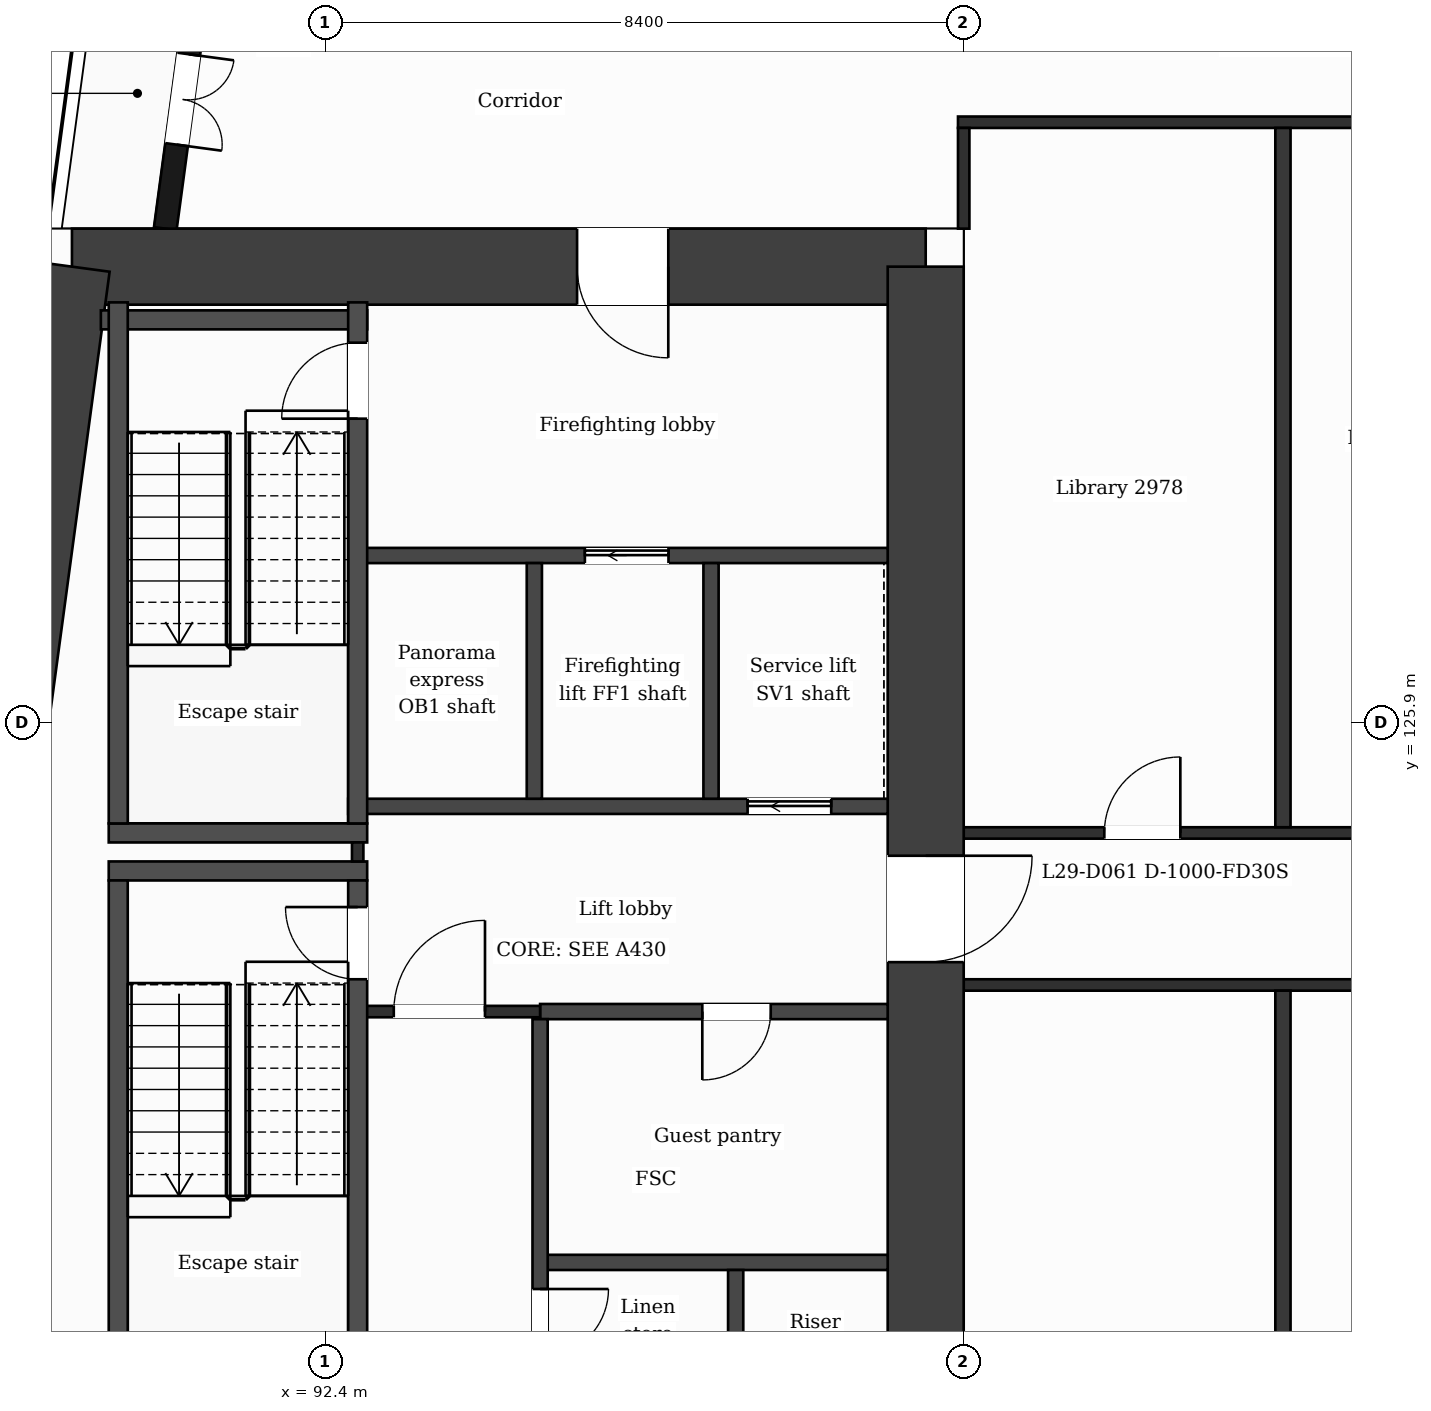
"""IFC4 building model, lengths in metres.
Left out: names, types, materials, properties, quantities, classifications, styles, units other than length and angle.
Written with IfcOpenShell. Run it as: python <this file> out.ifc"""

import sys

from ifc_helpers import new_model, si_unit, direction, frame, frame_2d, origin, place, context, subcontext, project, spatial, rectangle, extrude, element, fill, save


model = new_model("IFC4")
c1 = context("Model", 3, precision=1e-05, world=origin(), true_north=direction((0.0, 1.0)))
c2 = subcontext(c1, "Body", "Model", "MODEL_VIEW")
j1 = project(units=[si_unit("LENGTHUNIT", "METRE"), si_unit("PLANEANGLEUNIT", "RADIAN")], contexts=[c1])
p1 = place(None, origin())
s1 = spatial("IfcSite", under=j1, at=p1, CompositionType="ELEMENT")
p2 = place(p1, origin())
s2 = spatial("IfcBuilding", under=s1, at=p2, CompositionType="ELEMENT")
p3 = place(p2, frame((0.0, 0.0, 124.3)))
s3 = spatial("IfcBuildingStorey", under=s2, at=p3, CompositionType="ELEMENT", Elevation=124.3)
p4 = place(p3, frame((89.068, 131.9, 0.0), z_axis=(0.0, 0.0, 1.0), x_axis=(1.0, 0.0, 0.0)))
e1 = element("IfcWall", 1, at=p4, inside=s3, PredefinedType="SHEAR", context=c2, shape_type="SweptSolid", body=[
    extrude(rectangle(XDim=11.232, YDim=1.0, at=frame_2d((5.616, 0.0))), origin(), (0.0, 0.0, 1.0), 3.7),
])
p5 = place(p4, frame((6.646, 0.0, 0.0)))
e2 = element("IfcOpeningElement", 2, at=p5, cuts=e1, PredefinedType="OPENING", context=c2, shape_type="SweptSolid", body=[
    extrude(rectangle(XDim=1.2, YDim=2.1, at=frame_2d((0.6, 1.05))), frame((0.0, 0.51, 0.0), z_axis=(0.0, -1.0, 0.0), x_axis=(1.0, 0.0, 0.0)), (0.0, 0.0, 1.0), 1.02),
])
p6 = place(p3, frame((100.3, 131.9, 0.0), z_axis=(0.0, 0.0, 1.0), x_axis=(0.0, -1.0, 0.0)))
e3 = element("IfcWall", 3, at=p6, inside=s3, PredefinedType="SHEAR", context=c2, shape_type="SweptSolid", body=[
    extrude(rectangle(XDim=21.0, YDim=1.0, at=frame_2d((10.5, 0.0))), origin(), (0.0, 0.0, 1.0), 3.7),
])
p7 = place(p6, frame((7.75, 0.0, 0.0)))
e4 = element("IfcOpeningElement", 4, at=p7, cuts=e3, PredefinedType="OPENING", context=c2, shape_type="SweptSolid", body=[
    extrude(rectangle(XDim=1.4, YDim=2.1, at=frame_2d((0.7, 1.05))), frame((0.0, 0.51, 0.0), z_axis=(0.0, -1.0, 0.0), x_axis=(1.0, 0.0, 0.0)), (0.0, 0.0, 1.0), 1.02),
])
p8 = place(p3, frame((86.241, 110.9, 0.0), z_axis=(0.0, 0.0, 1.0), x_axis=(0.133411141623, 0.991060778808, 0.0)))
e5 = element("IfcWall", 5, at=p8, inside=s3, PredefinedType="SHEAR", context=c2, shape_type="SweptSolid", body=[
    extrude(rectangle(XDim=21.189, YDim=1.0, at=frame_2d((10.595, 0.0))), origin(), (0.0, 0.0, 1.0), 3.7),
])
p9 = place(p3, frame((91.177, 138.95, 0.0), z_axis=(0.0, 0.0, 1.0), x_axis=(-0.133426664613, -0.991058689065, 0.0)))
e6 = element("IfcWall", 6, at=p9, inside=s3, PredefinedType="SOLIDWALL", context=c2, shape_type="SweptSolid", body=[
    extrude(rectangle(XDim=6.609, YDim=0.3, at=frame_2d((3.305, 0.0))), origin(), (0.0, 0.0, 1.0), 3.38),
])
p10 = place(p9, frame((1.039, 0.0, 0.9)))
e7 = element("IfcOpeningElement", 7, at=p10, cuts=e6, PredefinedType="OPENING", context=c2, shape_type="SweptSolid", body=[
    extrude(rectangle(XDim=1.2, YDim=2.1, at=frame_2d((0.6, 1.05))), frame((0.0, 0.16, 0.0), z_axis=(0.0, -1.0, 0.0), x_axis=(1.0, 0.0, 0.0)), (0.0, 0.0, 1.0), 0.32),
])
p11 = place(p9, frame((4.294, 0.0, 0.0)))
e8 = element("IfcOpeningElement", 8, at=p11, cuts=e6, PredefinedType="OPENING", context=c2, shape_type="SweptSolid", body=[
    extrude(rectangle(XDim=1.2, YDim=2.4, at=frame_2d((0.6, 1.2))), frame((0.0, 0.16, 0.0), z_axis=(0.0, -1.0, 0.0), x_axis=(1.0, 0.0, 0.0)), (0.0, 0.0, 1.0), 0.32),
])
p12 = place(p3, frame((95.227, 118.8, 0.0), z_axis=(0.0, 0.0, 1.0), x_axis=(1.0, 0.0, 0.0)))
e9 = element("IfcWall", 9, at=p12, inside=s3, PredefinedType="PARTITIONING", context=c2, shape_type="SweptSolid", body=[
    extrude(rectangle(XDim=4.573, YDim=0.2, at=frame_2d((2.287, 0.0))), origin(), (0.0, 0.0, 1.0), 3.38),
])
p13 = place(p3, frame((95.227, 122.1, 0.0), z_axis=(0.0, 0.0, 1.0), x_axis=(1.0, 0.0, 0.0)))
e10 = element("IfcWall", 10, at=p13, inside=s3, PredefinedType="PARTITIONING", context=c2, shape_type="SweptSolid", body=[
    extrude(rectangle(XDim=4.573, YDim=0.2, at=frame_2d((2.287, 0.0))), origin(), (0.0, 0.0, 1.0), 3.38),
])
p14 = place(p13, frame((2.134, 0.0, 0.0)))
e11 = element("IfcOpeningElement", 11, at=p14, cuts=e10, PredefinedType="OPENING", context=c2, shape_type="SweptSolid", body=[
    extrude(rectangle(XDim=0.9, YDim=2.1, at=frame_2d((0.45, 1.05))), frame((0.0, 0.11, 0.0), z_axis=(0.0, -1.0, 0.0), x_axis=(1.0, 0.0, 0.0)), (0.0, 0.0, 1.0), 0.22),
])
p15 = place(p3, frame((92.827, 122.1, 0.0), z_axis=(0.0, 0.0, 1.0), x_axis=(1.0, 0.0, 0.0)))
e12 = element("IfcWall", 12, at=p15, inside=s3, PredefinedType="PARTITIONING", context=c2, shape_type="SweptSolid", body=[
    extrude(rectangle(XDim=2.4, YDim=0.15, at=frame_2d((1.2, 0.0))), origin(), (0.0, 0.0, 1.0), 3.38),
])
p16 = place(p15, frame((0.475, 0.0, 0.0)))
e13 = element("IfcOpeningElement", 13, at=p16, cuts=e12, PredefinedType="OPENING", context=c2, shape_type="SweptSolid", body=[
    extrude(rectangle(XDim=1.2, YDim=2.1, at=frame_2d((0.6, 1.05))), frame((0.0, 0.085, 0.0), z_axis=(0.0, -1.0, 0.0), x_axis=(1.0, 0.0, 0.0)), (0.0, 0.0, 1.0), 0.17),
])
p17 = place(p3, frame((100.8, 122.45, 0.0), z_axis=(0.0, 0.0, 1.0), x_axis=(1.0, 0.0, 0.0)))
e14 = element("IfcWall", 14, at=p17, inside=s3, PredefinedType="PARTITIONING", context=c2, shape_type="SweptSolid", body=[
    extrude(rectangle(XDim=25.2, YDim=0.15, at=frame_2d((12.6, 0.0))), origin(), (0.0, 0.0, 1.0), 3.38),
])
for number, where, z_axis, x_axis in (
    (15, (89.552, 123.95, 0.0), (0.0, 0.0, 1.0), (1.0, 0.0, 0.0)),
    (16, (89.552, 124.45, 0.0), (0.0, 0.0, 1.0), (1.0, 0.0, 0.0)),
):
    element("IfcWall", number, at=place(p3, frame(where, z_axis=z_axis, x_axis=x_axis)), inside=s3, PredefinedType="PARTITIONING", context=c2, shape_type="SweptSolid", body=[
        extrude(rectangle(XDim=3.4, YDim=0.25, at=frame_2d((1.7, 0.0))), origin(), (0.0, 0.0, 1.0), 3.38),
    ])
p18 = place(p3, frame((100.8, 124.45, 0.0), z_axis=(0.0, 0.0, 1.0), x_axis=(1.0, 0.0, 0.0)))
e17 = element("IfcWall", 17, at=p18, inside=s3, PredefinedType="PARTITIONING", context=c2, shape_type="SweptSolid", body=[
    extrude(rectangle(XDim=25.2, YDim=0.15, at=frame_2d((12.6, 0.0))), origin(), (0.0, 0.0, 1.0), 3.38),
])
p19 = place(p18, frame((1.85, 0.0, 0.0)))
e18 = element("IfcOpeningElement", 18, at=p19, cuts=e17, PredefinedType="OPENING", context=c2, shape_type="SweptSolid", body=[
    extrude(rectangle(XDim=1.0, YDim=2.1, at=frame_2d((0.5, 1.05))), frame((0.0, 0.085, 0.0), z_axis=(0.0, -1.0, 0.0), x_axis=(1.0, 0.0, 0.0)), (0.0, 0.0, 1.0), 0.17),
])
p20 = place(p18, frame((6.425, 0.0, 0.0)))
e19 = element("IfcOpeningElement", 19, at=p20, cuts=e17, PredefinedType="OPENING", context=c2, shape_type="SweptSolid", body=[
    extrude(rectangle(XDim=1.0, YDim=2.1, at=frame_2d((0.5, 1.05))), frame((0.0, 0.085, 0.0), z_axis=(0.0, -1.0, 0.0), x_axis=(1.0, 0.0, 0.0)), (0.0, 0.0, 1.0), 0.17),
])
p21 = place(p18, frame((12.77, 0.0, 0.0)))
e20 = element("IfcOpeningElement", 20, at=p21, cuts=e17, PredefinedType="OPENING", context=c2, shape_type="SweptSolid", body=[
    extrude(rectangle(XDim=1.0, YDim=2.1, at=frame_2d((0.5, 1.05))), frame((0.0, 0.085, 0.0), z_axis=(0.0, -1.0, 0.0), x_axis=(1.0, 0.0, 0.0)), (0.0, 0.0, 1.0), 0.17),
])
p22 = place(p18, frame((17.8, 0.0, 0.0)))
e21 = element("IfcOpeningElement", 21, at=p22, cuts=e17, PredefinedType="OPENING", context=c2, shape_type="SweptSolid", body=[
    extrude(rectangle(XDim=1.0, YDim=2.1, at=frame_2d((0.5, 1.05))), frame((0.0, 0.085, 0.0), z_axis=(0.0, -1.0, 0.0), x_axis=(1.0, 0.0, 0.0)), (0.0, 0.0, 1.0), 0.17),
])
p23 = place(p18, frame((22.85, 0.0, 0.0)))
e22 = element("IfcOpeningElement", 22, at=p23, cuts=e17, PredefinedType="OPENING", context=c2, shape_type="SweptSolid", body=[
    extrude(rectangle(XDim=1.0, YDim=2.1, at=frame_2d((0.5, 1.05))), frame((0.0, 0.085, 0.0), z_axis=(0.0, -1.0, 0.0), x_axis=(1.0, 0.0, 0.0)), (0.0, 0.0, 1.0), 0.17),
])
p24 = place(p3, frame((92.702, 124.8, 0.0), z_axis=(0.0, 0.0, 1.0), x_axis=(1.0, 0.0, 0.0)))
e23 = element("IfcWall", 23, at=p24, inside=s3, PredefinedType="PARTITIONING", context=c2, shape_type="SweptSolid", body=[
    extrude(rectangle(XDim=7.098, YDim=0.2, at=frame_2d((3.549, 0.0))), origin(), (0.0, 0.0, 1.0), 3.38),
])
p25 = place(p24, frame((5.255, 0.0, 0.0)))
e24 = element("IfcOpeningElement", 24, at=p25, cuts=e23, PredefinedType="OPENING", context=c2, shape_type="SweptSolid", body=[
    extrude(rectangle(XDim=1.1, YDim=2.1, at=frame_2d((0.55, 1.05))), frame((0.0, 0.11, 0.0), z_axis=(0.0, -1.0, 0.0), x_axis=(1.0, 0.0, 0.0)), (0.0, 0.0, 1.0), 0.22),
])
p26 = place(p3, frame((92.827, 128.1, 0.0), z_axis=(0.0, 0.0, 1.0), x_axis=(1.0, 0.0, 0.0)))
e25 = element("IfcWall", 25, at=p26, inside=s3, PredefinedType="PARTITIONING", context=c2, shape_type="SweptSolid", body=[
    extrude(rectangle(XDim=6.973, YDim=0.2, at=frame_2d((3.487, 0.0))), origin(), (0.0, 0.0, 1.0), 3.38),
])
p27 = place(p26, frame((2.989, 0.0, 0.0)))
e26 = element("IfcOpeningElement", 26, at=p27, cuts=e25, PredefinedType="OPENING", context=c2, shape_type="SweptSolid", body=[
    extrude(rectangle(XDim=1.1, YDim=2.1, at=frame_2d((0.55, 1.05))), frame((0.0, 0.11, 0.0), z_axis=(0.0, -1.0, 0.0), x_axis=(1.0, 0.0, 0.0)), (0.0, 0.0, 1.0), 0.22),
])
p28 = place(p3, frame((89.448, 131.2, 0.0), z_axis=(0.0, 0.0, 1.0), x_axis=(1.0, 0.0, 0.0)))
e27 = element("IfcWall", 27, at=p28, inside=s3, PredefinedType="PARTITIONING", context=c2, shape_type="SweptSolid", body=[
    extrude(rectangle(XDim=3.504, YDim=0.25, at=frame_2d((1.752, 0.0))), origin(), (0.0, 0.0, 1.0), 3.38),
])
p29 = place(p3, frame((100.725, 133.8, 0.0), z_axis=(0.0, 0.0, 1.0), x_axis=(1.0, 0.0, 0.0)))
e28 = element("IfcWall", 28, at=p29, inside=s3, PredefinedType="PARTITIONING", context=c2, shape_type="SweptSolid", body=[
    extrude(rectangle(XDim=25.35, YDim=0.15, at=frame_2d((12.675, 0.0))), origin(), (0.0, 0.0, 1.0), 3.38),
])
p30 = place(p29, frame((18.225, 0.0, 0.0)))
e29 = element("IfcOpeningElement", 29, at=p30, cuts=e28, PredefinedType="OPENING", context=c2, shape_type="SweptSolid", body=[
    extrude(rectangle(XDim=1.0, YDim=2.1, at=frame_2d((0.5, 1.05))), frame((0.0, 0.085, 0.0), z_axis=(0.0, -1.0, 0.0), x_axis=(1.0, 0.0, 0.0)), (0.0, 0.0, 1.0), 0.17),
])
for number, where, z_axis, x_axis in (
    (30, (89.677, 116.97, 0.0), (0.0, 0.0, 1.0), (0.0, 1.0, 0.0)),
    (31, (89.677, 124.575, 0.0), (0.0, 0.0, 1.0), (0.0, 1.0, 0.0)),
):
    element("IfcWall", number, at=place(p3, frame(where, z_axis=z_axis, x_axis=x_axis)), inside=s3, PredefinedType="PARTITIONING", context=c2, shape_type="SweptSolid", body=[
        extrude(rectangle(XDim=6.855, YDim=0.25, at=frame_2d((3.427, 0.0))), origin(), (0.0, 0.0, 1.0), 3.38),
    ])
p31 = place(p3, frame((92.827, 124.075, 0.0), z_axis=(0.0, 0.0, 1.0), x_axis=(0.0, 1.0, 0.0)))
e32 = element("IfcWall", 32, at=p31, inside=s3, PredefinedType="PARTITIONING", context=c2, shape_type="SweptSolid", body=[
    extrude(rectangle(XDim=0.25, YDim=0.15, at=frame_2d((0.125, 0.0))), origin(), (0.0, 0.0, 1.0), 3.38),
])
p32 = place(p3, frame((92.827, 116.97, 0.0), z_axis=(0.0, 0.0, 1.0), x_axis=(0.0, 1.0, 0.0)))
e33 = element("IfcWall", 33, at=p32, inside=s3, PredefinedType="PARTITIONING", context=c2, shape_type="SweptSolid", body=[
    extrude(rectangle(XDim=6.855, YDim=0.25, at=frame_2d((3.427, 0.0))), origin(), (0.0, 0.0, 1.0), 3.38),
])
p33 = place(p32, frame((5.555, 0.0, 0.0)))
e34 = element("IfcOpeningElement", 34, at=p33, cuts=e33, PredefinedType="OPENING", context=c2, shape_type="SweptSolid", body=[
    extrude(rectangle(XDim=0.95, YDim=2.1, at=frame_2d((0.475, 1.05))), frame((0.0, 0.135, 0.0), z_axis=(0.0, -1.0, 0.0), x_axis=(1.0, 0.0, 0.0)), (0.0, 0.0, 1.0), 0.27),
])
p34 = place(p3, frame((92.827, 124.575, 0.0), z_axis=(0.0, 0.0, 1.0), x_axis=(0.0, 1.0, 0.0)))
e35 = element("IfcWall", 35, at=p34, inside=s3, PredefinedType="PARTITIONING", context=c2, shape_type="SweptSolid", body=[
    extrude(rectangle(XDim=6.855, YDim=0.25, at=frame_2d((3.427, 0.0))), origin(), (0.0, 0.0, 1.0), 3.38),
])
p35 = place(p34, frame((5.325, 0.0, 0.0)))
e36 = element("IfcOpeningElement", 36, at=p35, cuts=e35, PredefinedType="OPENING", context=c2, shape_type="SweptSolid", body=[
    extrude(rectangle(XDim=1.0, YDim=2.1, at=frame_2d((0.5, 1.05))), frame((0.0, 0.135, 0.0), z_axis=(0.0, -1.0, 0.0), x_axis=(1.0, 0.0, 0.0)), (0.0, 0.0, 1.0), 0.27),
])
p36 = place(p3, frame((95.151, 124.9, 0.0), z_axis=(0.0, 0.0, 1.0), x_axis=(0.0, 1.0, 0.0)))
e37 = element("IfcWall", 37, at=p36, inside=s3, PredefinedType="PARTITIONING", context=c2, shape_type="SweptSolid", body=[
    extrude(rectangle(XDim=3.1, YDim=0.2, at=frame_2d((1.55, 0.0))), origin(), (0.0, 0.0, 1.0), 3.38),
])
p37 = place(p3, frame((95.227, 116.97, 0.0), z_axis=(0.0, 0.0, 1.0), x_axis=(0.0, 1.0, 0.0)))
e38 = element("IfcWall", 38, at=p37, inside=s3, PredefinedType="PARTITIONING", context=c2, shape_type="SweptSolid", body=[
    extrude(rectangle(XDim=5.03, YDim=0.2, at=frame_2d((2.515, 0.0))), origin(), (0.0, 0.0, 1.0), 3.38),
])
p38 = place(p37, frame((0.58, 0.0, 0.0)))
e39 = element("IfcOpeningElement", 39, at=p38, cuts=e38, PredefinedType="OPENING", context=c2, shape_type="SweptSolid", body=[
    extrude(rectangle(XDim=0.9, YDim=2.1, at=frame_2d((0.45, 1.05))), frame((0.0, 0.11, 0.0), z_axis=(0.0, -1.0, 0.0), x_axis=(1.0, 0.0, 0.0)), (0.0, 0.0, 1.0), 0.22),
])
p39 = place(p3, frame((97.476, 124.9, 0.0), z_axis=(0.0, 0.0, 1.0), x_axis=(0.0, 1.0, 0.0)))
e40 = element("IfcWall", 40, at=p39, inside=s3, PredefinedType="PARTITIONING", context=c2, shape_type="SweptSolid", body=[
    extrude(rectangle(XDim=3.1, YDim=0.2, at=frame_2d((1.55, 0.0))), origin(), (0.0, 0.0, 1.0), 3.38),
])
p40 = place(p3, frame((97.8, 116.97, 0.0), z_axis=(0.0, 0.0, 1.0), x_axis=(0.0, 1.0, 0.0)))
e41 = element("IfcWall", 41, at=p40, inside=s3, PredefinedType="PARTITIONING", context=c2, shape_type="SweptSolid", body=[
    extrude(rectangle(XDim=1.73, YDim=0.2, at=frame_2d((0.865, 0.0))), origin(), (0.0, 0.0, 1.0), 3.38),
])
p41 = place(p3, frame((100.8, 132.4, 0.0), z_axis=(0.0, 0.0, 1.0), x_axis=(0.0, 1.0, 0.0)))
e42 = element("IfcWall", 42, at=p41, inside=s3, PredefinedType="PARTITIONING", context=c2, shape_type="SweptSolid", body=[
    extrude(rectangle(XDim=1.325, YDim=0.15, at=frame_2d((0.663, 0.0))), origin(), (0.0, 0.0, 1.0), 3.38),
])
p42 = place(p3, frame((105.0, 109.075, 0.0), z_axis=(0.0, 0.0, 1.0), x_axis=(0.0, 1.0, 0.0)))
e43 = element("IfcWall", 43, at=p42, inside=s3, PredefinedType="PARTITIONING", context=c2, shape_type="SweptSolid", body=[
    extrude(rectangle(XDim=13.3, YDim=0.2, at=frame_2d((6.65, 0.0))), origin(), (0.0, 0.0, 1.0), 3.38),
])
p43 = place(p3, frame((105.0, 124.525, 0.0), z_axis=(0.0, 0.0, 1.0), x_axis=(0.0, 1.0, 0.0)))
e44 = element("IfcWall", 44, at=p43, inside=s3, PredefinedType="PARTITIONING", context=c2, shape_type="SweptSolid", body=[
    extrude(rectangle(XDim=9.2, YDim=0.2, at=frame_2d((4.6, 0.0))), origin(), (0.0, 0.0, 1.0), 3.38),
])
p44 = place(p11, origin())
e45 = element("IfcDoor", 45, at=p44, inside=s3, OperationType="DOUBLE_DOOR_SINGLE_SWING", PredefinedType="DOOR", context=c2, shape_type="SweptSolid", body=[
    extrude(rectangle(XDim=1.2, YDim=2.4, at=frame_2d((0.6, 1.2))), frame((0.0, 0.025, 0.0), z_axis=(0.0, -1.0, 0.0), x_axis=(1.0, 0.0, 0.0)), (0.0, 0.0, 1.0), 0.05),
])
fill(e8, e45)
p45 = place(p16, origin())
e46 = element("IfcDoor", 46, at=p45, inside=s3, OperationType="SINGLE_SWING_RIGHT", PredefinedType="DOOR", context=c2, shape_type="SweptSolid", body=[
    extrude(rectangle(XDim=1.2, YDim=2.1, at=frame_2d((0.6, 1.05))), frame((0.0, 0.025, 0.0), z_axis=(0.0, -1.0, 0.0), x_axis=(1.0, 0.0, 0.0)), (0.0, 0.0, 1.0), 0.05),
])
fill(e13, e46)
p46 = place(p27, origin())
e47 = element("IfcDoor", 47, at=p46, inside=s3, OperationType="SLIDING_TO_LEFT", PredefinedType="DOOR", context=c2, shape_type="SweptSolid", body=[
    extrude(rectangle(XDim=1.1, YDim=2.1, at=frame_2d((0.55, 1.05))), frame((0.0, 0.025, 0.0), z_axis=(0.0, -1.0, 0.0), x_axis=(1.0, 0.0, 0.0)), (0.0, 0.0, 1.0), 0.05),
])
fill(e26, e47)
p47 = place(p25, origin())
e48 = element("IfcDoor", 48, at=p47, inside=s3, OperationType="SLIDING_TO_LEFT", PredefinedType="DOOR", context=c2, shape_type="SweptSolid", body=[
    extrude(rectangle(XDim=1.1, YDim=2.1, at=frame_2d((0.55, 1.05))), frame((0.0, 0.025, 0.0), z_axis=(0.0, -1.0, 0.0), x_axis=(1.0, 0.0, 0.0)), (0.0, 0.0, 1.0), 0.05),
])
fill(e24, e48)
p48 = place(p14, origin())
e49 = element("IfcDoor", 49, at=p48, inside=s3, OperationType="SINGLE_SWING_LEFT", PredefinedType="DOOR", context=c2, shape_type="SweptSolid", body=[
    extrude(rectangle(XDim=0.9, YDim=2.1, at=frame_2d((0.45, 1.05))), frame((0.0, 0.025, 0.0), z_axis=(0.0, -1.0, 0.0), x_axis=(1.0, 0.0, 0.0)), (0.0, 0.0, 1.0), 0.05),
])
fill(e11, e49)
p49 = place(p33, origin())
e50 = element("IfcDoor", 50, at=p49, inside=s3, OperationType="SINGLE_SWING_RIGHT", PredefinedType="DOOR", context=c2, shape_type="SweptSolid", body=[
    extrude(rectangle(XDim=0.95, YDim=2.1, at=frame_2d((0.475, 1.05))), frame((0.0, 0.025, 0.0), z_axis=(0.0, -1.0, 0.0), x_axis=(1.0, 0.0, 0.0)), (0.0, 0.0, 1.0), 0.05),
])
fill(e34, e50)
p50 = place(p35, origin())
e51 = element("IfcDoor", 51, at=p50, inside=s3, OperationType="SINGLE_SWING_LEFT", PredefinedType="DOOR", context=c2, shape_type="SweptSolid", body=[
    extrude(rectangle(XDim=1.0, YDim=2.1, at=frame_2d((0.5, 1.05))), frame((0.0, 0.025, 0.0), z_axis=(0.0, -1.0, 0.0), x_axis=(1.0, 0.0, 0.0)), (0.0, 0.0, 1.0), 0.05),
])
fill(e36, e51)
p51 = place(p38, origin())
e52 = element("IfcDoor", 52, at=p51, inside=s3, OperationType="SINGLE_SWING_RIGHT", PredefinedType="DOOR", context=c2, shape_type="SweptSolid", body=[
    extrude(rectangle(XDim=0.9, YDim=2.1, at=frame_2d((0.45, 1.05))), frame((0.0, 0.025, 0.0), z_axis=(0.0, -1.0, 0.0), x_axis=(1.0, 0.0, 0.0)), (0.0, 0.0, 1.0), 0.05),
])
fill(e39, e52)
p52 = place(p19, origin())
e53 = element("IfcDoor", 53, at=p52, inside=s3, OperationType="SINGLE_SWING_RIGHT", PredefinedType="DOOR", context=c2, shape_type="SweptSolid", body=[
    extrude(rectangle(XDim=1.0, YDim=2.1, at=frame_2d((0.5, 1.05))), frame((0.0, 0.025, 0.0), z_axis=(0.0, -1.0, 0.0), x_axis=(1.0, 0.0, 0.0)), (0.0, 0.0, 1.0), 0.05),
])
fill(e18, e53)
p53 = place(p5, origin())
e54 = element("IfcDoor", 54, at=p53, inside=s3, OperationType="SINGLE_SWING_RIGHT", PredefinedType="DOOR", context=c2, shape_type="SweptSolid", body=[
    extrude(rectangle(XDim=1.2, YDim=2.1, at=frame_2d((0.6, 1.05))), frame((0.0, 0.025, 0.0), z_axis=(0.0, -1.0, 0.0), x_axis=(1.0, 0.0, 0.0)), (0.0, 0.0, 1.0), 0.05),
])
fill(e2, e54)
p54 = place(p7, origin())
e55 = element("IfcDoor", 55, at=p54, inside=s3, OperationType="SINGLE_SWING_LEFT", PredefinedType="DOOR", context=c2, shape_type="SweptSolid", body=[
    extrude(rectangle(XDim=1.4, YDim=2.1, at=frame_2d((0.7, 1.05))), frame((0.0, 0.025, 0.0), z_axis=(0.0, -1.0, 0.0), x_axis=(1.0, 0.0, 0.0)), (0.0, 0.0, 1.0), 0.05),
])
fill(e4, e55)
save(model, sys.argv[1])
